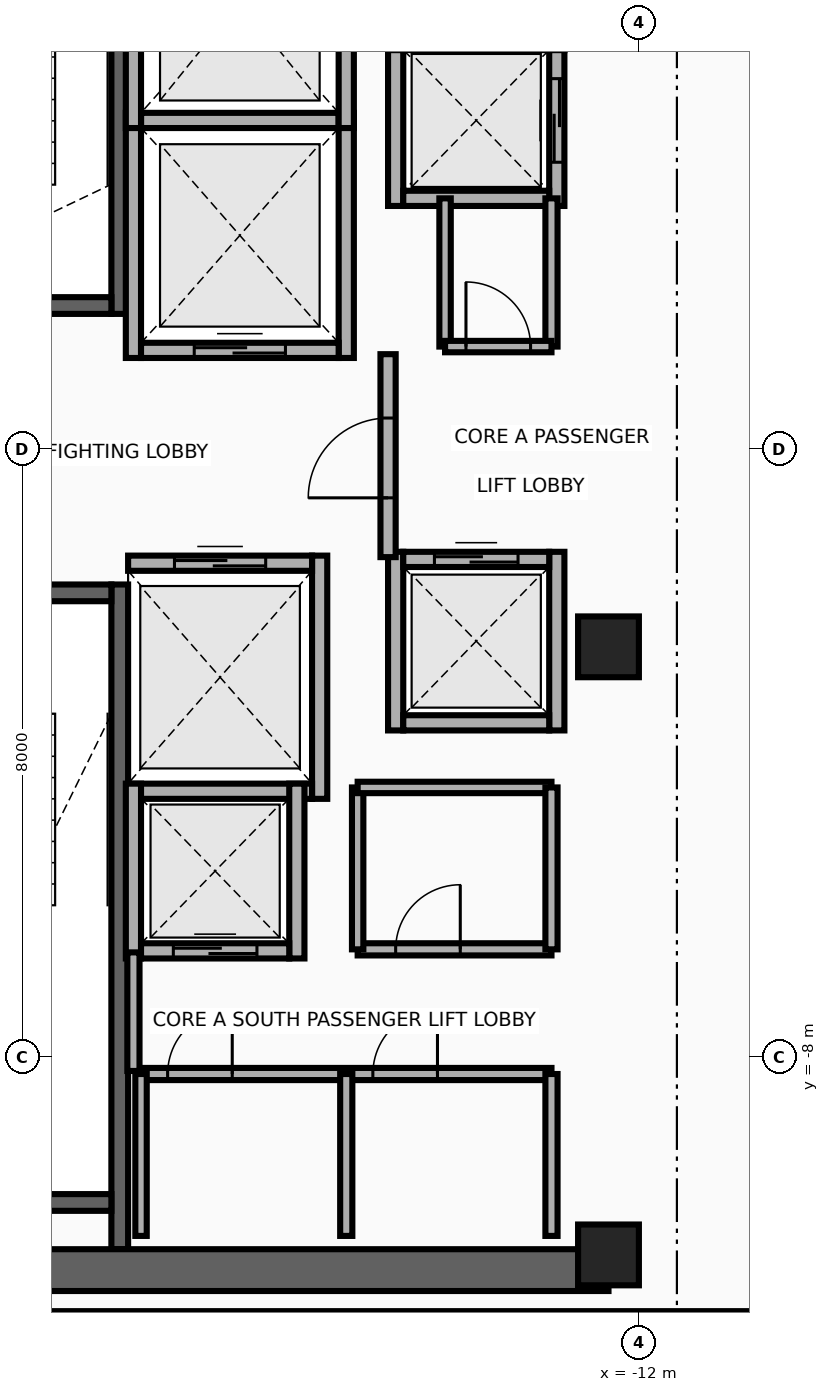
"""IFC4 building model, lengths in metres.
Left out: names, types, materials, properties, quantities, classifications, styles, units other than length and angle.
Written with IfcOpenShell. Run it as: python <this file> out.ifc"""

import sys

from ifc_helpers import new_model, si_unit, direction, frame, frame_2d, origin, origin_2d, place, context, subcontext, project, spatial, rectangle, extrude, source, transform, mapped, element, fill, save


model = new_model("IFC4")
c1 = context("Model", 3, precision=1e-05, world=origin(), true_north=direction((0.0, 1.0)))
c2 = subcontext(c1, "Body", "Model", "MODEL_VIEW")
j1 = project(units=[si_unit("LENGTHUNIT", "METRE"), si_unit("PLANEANGLEUNIT", "RADIAN")], contexts=[c1])
p1 = place(None, origin())
s1 = spatial("IfcSite", under=j1, at=p1, CompositionType="ELEMENT")
p2 = place(p1, origin())
s2 = spatial("IfcBuilding", under=s1, at=p2, CompositionType="ELEMENT")
p3 = place(p2, frame((0.0, 0.0, 280.0)))
s3 = spatial("IfcBuildingStorey", under=s2, at=p3, CompositionType="ELEMENT", Elevation=280.0)
p4 = place(p3, frame((-18.83, 1.78, 0.0), z_axis=(0.0, 0.0, 1.0), x_axis=(0.0, 1.0, 0.0)))
e1 = element("IfcWall", 1, at=p4, inside=s3, PredefinedType="SHEAR", context=c2, shape_type="SweptSolid", body=[
    extrude(rectangle(XDim=8.745, YDim=0.22, at=frame_2d((4.373, 0.0))), origin(), (0.0, 0.0, 1.0), 3.26),
])
p5 = place(p3, frame((-22.05, 1.89, 0.0), z_axis=(0.0, 0.0, 1.0), x_axis=(1.0, 0.0, 0.0)))
e2 = element("IfcWall", 2, at=p5, inside=s3, PredefinedType="SHEAR", context=c2, shape_type="SweptSolid", body=[
    extrude(rectangle(XDim=3.11, YDim=0.22, at=frame_2d((1.555, 0.0))), origin(), (0.0, 0.0, 1.0), 3.26),
])
p6 = place(p5, frame((1.0, 0.0, 0.0)))
e3 = element("IfcOpeningElement", 3, at=p6, cuts=e2, PredefinedType="OPENING", context=c2, shape_type="SweptSolid", body=[
    extrude(rectangle(XDim=1.1, YDim=2.15, at=frame_2d((0.55, 1.075))), frame((0.0, 0.125, 0.0), z_axis=(0.0, -1.0, 0.0), x_axis=(1.0, 0.0, 0.0)), (0.0, 0.0, 1.0), 0.25),
])
p7 = place(p3, frame((-18.83, -10.525, 0.0), z_axis=(0.0, 0.0, 1.0), x_axis=(0.0, 1.0, 0.0)))
e4 = element("IfcWall", 4, at=p7, inside=s3, PredefinedType="SHEAR", context=c2, shape_type="SweptSolid", body=[
    extrude(rectangle(XDim=8.745, YDim=0.22, at=frame_2d((4.373, 0.0))), origin(), (0.0, 0.0, 1.0), 3.26),
])
p8 = place(p3, frame((-22.05, -9.91, 0.0), z_axis=(0.0, 0.0, 1.0), x_axis=(1.0, 0.0, 0.0)))
e5 = element("IfcWall", 5, at=p8, inside=s3, PredefinedType="SHEAR", context=c2, shape_type="SweptSolid", body=[
    extrude(rectangle(XDim=3.11, YDim=0.22, at=frame_2d((1.555, 0.0))), origin(), (0.0, 0.0, 1.0), 3.26),
])
p9 = place(p3, frame((-22.05, -1.89, 0.0), z_axis=(0.0, 0.0, 1.0), x_axis=(1.0, 0.0, 0.0)))
e6 = element("IfcWall", 6, at=p9, inside=s3, PredefinedType="SHEAR", context=c2, shape_type="SweptSolid", body=[
    extrude(rectangle(XDim=3.11, YDim=0.22, at=frame_2d((1.555, 0.0))), origin(), (0.0, 0.0, 1.0), 3.26),
])
p10 = place(p9, frame((1.0, 0.0, 0.0)))
e7 = element("IfcOpeningElement", 7, at=p10, cuts=e6, PredefinedType="OPENING", context=c2, shape_type="SweptSolid", body=[
    extrude(rectangle(XDim=1.1, YDim=2.15, at=frame_2d((0.55, 1.075))), frame((0.0, 0.125, 0.0), z_axis=(0.0, -1.0, 0.0), x_axis=(1.0, 0.0, 0.0)), (0.0, 0.0, 1.0), 0.25),
])
p11 = place(p3, frame((-22.65, -10.8, 0.0), z_axis=(0.0, 0.0, 1.0), x_axis=(1.0, 0.0, 0.0)))
e8 = element("IfcWall", 8, at=p11, inside=s3, PredefinedType="SHEAR", context=c2, shape_type="SweptSolid", body=[
    extrude(rectangle(XDim=10.25, YDim=0.55, at=frame_2d((5.125, 0.0))), origin(), (0.0, 0.0, 1.0), 3.26),
])
m1 = source(origin(), c2, "Body", "SweptSolid", [
    extrude(rectangle(XDim=0.8, YDim=0.8, at=origin_2d()), origin(), (0.0, 0.0, 1.0), 3.5),
])
for number, where, z_axis, x_axis in (
    (9, (-12.4, -10.6, 0.0), (0.0, 0.0, 1.0), (1.0, 0.0, 0.0)),
    (10, (-12.4, -2.6, 0.0), (0.0, 0.0, 1.0), (1.0, 0.0, 0.0)),
):
    element("IfcColumn", number, at=place(p3, frame(where, z_axis=z_axis, x_axis=x_axis)), inside=s3, PredefinedType="COLUMN", context=c2, shape_type="MappedRepresentation", body=[
        mapped(m1, transform((0.0, 0.0, 0.0), x_axis=(1.0, 0.0, 0.0), y_axis=(0.0, 1.0, 0.0), z_axis=(0.0, 0.0, 1.0), scale=1.0)),
    ])
for number, where, z_axis, x_axis in (
    (11, (-18.65, 1.2, 0.0), (0.0, 0.0, 1.0), (0.0, 1.0, 0.0)),
    (12, (-15.85, 1.2, 0.0), (0.0, 0.0, 1.0), (0.0, 1.0, 0.0)),
):
    element("IfcWall", number, at=place(p3, frame(where, z_axis=z_axis, x_axis=x_axis)), inside=s3, PredefinedType="MOVABLE", context=c2, shape_type="SweptSolid", body=[
        extrude(rectangle(XDim=3.225, YDim=0.2, at=frame_2d((1.613, 0.0))), origin(), (0.0, 0.0, 1.0), 3.26),
    ])
p12 = place(p3, frame((-18.55, 1.3, 0.0), z_axis=(0.0, 0.0, 1.0), x_axis=(1.0, 0.0, 0.0)))
e13 = element("IfcWall", 13, at=p12, inside=s3, PredefinedType="MOVABLE", context=c2, shape_type="SweptSolid", body=[
    extrude(rectangle(XDim=2.6, YDim=0.2, at=frame_2d((1.3, 0.0))), origin(), (0.0, 0.0, 1.0), 3.26),
])
p13 = place(p12, frame((0.7, 0.0, 0.0)))
e14 = element("IfcOpeningElement", 14, at=p13, cuts=e13, PredefinedType="OPENING", context=c2, shape_type="SweptSolid", body=[
    extrude(rectangle(XDim=1.2, YDim=2.1, at=frame_2d((0.6, 1.05))), frame((0.0, 0.115, 0.0), z_axis=(0.0, -1.0, 0.0), x_axis=(1.0, 0.0, 0.0)), (0.0, 0.0, 1.0), 0.23),
])
p14 = place(p3, frame((-18.55, 4.325, 0.0), z_axis=(0.0, 0.0, 1.0), x_axis=(1.0, 0.0, 0.0)))
e15 = element("IfcWall", 15, at=p14, inside=s3, PredefinedType="MOVABLE", context=c2, shape_type="SweptSolid", body=[
    extrude(rectangle(XDim=2.6, YDim=0.2, at=frame_2d((1.3, 0.0))), origin(), (0.0, 0.0, 1.0), 3.26),
])
p15 = place(p3, frame((-16.2, -4.6, 0.0), z_axis=(0.0, 0.0, 1.0), x_axis=(0.0, 1.0, 0.0)))
e16 = element("IfcWall", 16, at=p15, inside=s3, PredefinedType="MOVABLE", context=c2, shape_type="SweptSolid", body=[
    extrude(rectangle(XDim=3.2, YDim=0.2, at=frame_2d((1.6, 0.0))), origin(), (0.0, 0.0, 1.0), 3.26),
])
p16 = place(p3, frame((-18.72, -4.5, 0.0), z_axis=(0.0, 0.0, 1.0), x_axis=(1.0, 0.0, 0.0)))
e17 = element("IfcWall", 17, at=p16, inside=s3, PredefinedType="MOVABLE", context=c2, shape_type="SweptSolid", body=[
    extrude(rectangle(XDim=2.42, YDim=0.2, at=frame_2d((1.21, 0.0))), origin(), (0.0, 0.0, 1.0), 3.26),
])
p17 = place(p3, frame((-18.72, -1.5, 0.0), z_axis=(0.0, 0.0, 1.0), x_axis=(1.0, 0.0, 0.0)))
e18 = element("IfcWall", 18, at=p17, inside=s3, PredefinedType="MOVABLE", context=c2, shape_type="SweptSolid", body=[
    extrude(rectangle(XDim=2.42, YDim=0.2, at=frame_2d((1.21, 0.0))), origin(), (0.0, 0.0, 1.0), 3.26),
])
p18 = place(p17, frame((0.61, 0.0, 0.0)))
e19 = element("IfcOpeningElement", 19, at=p18, cuts=e18, PredefinedType="OPENING", context=c2, shape_type="SweptSolid", body=[
    extrude(rectangle(XDim=1.2, YDim=2.1, at=frame_2d((0.6, 1.05))), frame((0.0, 0.115, 0.0), z_axis=(0.0, -1.0, 0.0), x_axis=(1.0, 0.0, 0.0)), (0.0, 0.0, 1.0), 0.23),
])
for number, where, z_axis, x_axis in (
    (20, (-18.65, 4.225, 0.0), (0.0, 0.0, 1.0), (0.0, 1.0, 0.0)),
    (21, (-15.85, 4.225, 0.0), (0.0, 0.0, 1.0), (0.0, 1.0, 0.0)),
):
    element("IfcWall", number, at=place(p3, frame(where, z_axis=z_axis, x_axis=x_axis)), inside=s3, PredefinedType="MOVABLE", context=c2, shape_type="SweptSolid", body=[
        extrude(rectangle(XDim=3.325, YDim=0.2, at=frame_2d((1.663, 0.0))), origin(), (0.0, 0.0, 1.0), 3.26),
    ])
p19 = place(p3, frame((-15.2, 3.2, 0.0), z_axis=(0.0, 0.0, 1.0), x_axis=(0.0, 1.0, 0.0)))
e22 = element("IfcWall", 22, at=p19, inside=s3, PredefinedType="MOVABLE", context=c2, shape_type="SweptSolid", body=[
    extrude(rectangle(XDim=2.25, YDim=0.2, at=frame_2d((1.125, 0.0))), origin(), (0.0, 0.0, 1.0), 3.26),
])
p20 = place(p3, frame((-13.08, 3.2, 0.0), z_axis=(0.0, 0.0, 1.0), x_axis=(0.0, 1.0, 0.0)))
e23 = element("IfcWall", 23, at=p20, inside=s3, PredefinedType="MOVABLE", context=c2, shape_type="SweptSolid", body=[
    extrude(rectangle(XDim=2.25, YDim=0.2, at=frame_2d((1.125, 0.0))), origin(), (0.0, 0.0, 1.0), 3.26),
])
p21 = place(p20, frame((0.575, 0.0, 0.0)))
e24 = element("IfcOpeningElement", 24, at=p21, cuts=e23, PredefinedType="OPENING", context=c2, shape_type="SweptSolid", body=[
    extrude(rectangle(XDim=1.1, YDim=2.1, at=frame_2d((0.55, 1.05))), frame((0.0, 0.115, 0.0), z_axis=(0.0, -1.0, 0.0), x_axis=(1.0, 0.0, 0.0)), (0.0, 0.0, 1.0), 0.23),
])
p22 = place(p3, frame((-15.1, 3.3, 0.0), z_axis=(0.0, 0.0, 1.0), x_axis=(1.0, 0.0, 0.0)))
e25 = element("IfcWall", 25, at=p22, inside=s3, PredefinedType="MOVABLE", context=c2, shape_type="SweptSolid", body=[
    extrude(rectangle(XDim=1.92, YDim=0.2, at=frame_2d((0.96, 0.0))), origin(), (0.0, 0.0, 1.0), 3.26),
])
for number, where, z_axis, x_axis in (
    (26, (-18.65, -6.7, 0.0), (0.0, 0.0, 1.0), (0.0, 1.0, 0.0)),
    (27, (-16.5, -6.7, 0.0), (0.0, 0.0, 1.0), (0.0, 1.0, 0.0)),
):
    element("IfcWall", number, at=place(p3, frame(where, z_axis=z_axis, x_axis=x_axis)), inside=s3, PredefinedType="MOVABLE", context=c2, shape_type="SweptSolid", body=[
        extrude(rectangle(XDim=2.3, YDim=0.2, at=frame_2d((1.15, 0.0))), origin(), (0.0, 0.0, 1.0), 3.26),
    ])
p23 = place(p3, frame((-18.55, -6.6, 0.0), z_axis=(0.0, 0.0, 1.0), x_axis=(1.0, 0.0, 0.0)))
e28 = element("IfcWall", 28, at=p23, inside=s3, PredefinedType="MOVABLE", context=c2, shape_type="SweptSolid", body=[
    extrude(rectangle(XDim=1.95, YDim=0.2, at=frame_2d((0.975, 0.0))), origin(), (0.0, 0.0, 1.0), 3.26),
])
p24 = place(p23, frame((0.425, 0.0, 0.0)))
e29 = element("IfcOpeningElement", 29, at=p24, cuts=e28, PredefinedType="OPENING", context=c2, shape_type="SweptSolid", body=[
    extrude(rectangle(XDim=1.1, YDim=2.1, at=frame_2d((0.55, 1.05))), frame((0.0, 0.115, 0.0), z_axis=(0.0, -1.0, 0.0), x_axis=(1.0, 0.0, 0.0)), (0.0, 0.0, 1.0), 0.23),
])
for number, where, z_axis, x_axis in (
    (30, (-15.2, -3.7, 0.0), (0.0, 0.0, 1.0), (0.0, 1.0, 0.0)),
    (31, (-13.08, -3.7, 0.0), (0.0, 0.0, 1.0), (0.0, 1.0, 0.0)),
):
    element("IfcWall", number, at=place(p3, frame(where, z_axis=z_axis, x_axis=x_axis)), inside=s3, PredefinedType="MOVABLE", context=c2, shape_type="SweptSolid", body=[
        extrude(rectangle(XDim=2.35, YDim=0.2, at=frame_2d((1.175, 0.0))), origin(), (0.0, 0.0, 1.0), 3.26),
    ])
p25 = place(p3, frame((-15.1, -3.6, 0.0), z_axis=(0.0, 0.0, 1.0), x_axis=(1.0, 0.0, 0.0)))
e32 = element("IfcWall", 32, at=p25, inside=s3, PredefinedType="MOVABLE", context=c2, shape_type="SweptSolid", body=[
    extrude(rectangle(XDim=1.92, YDim=0.2, at=frame_2d((0.96, 0.0))), origin(), (0.0, 0.0, 1.0), 3.26),
])
p26 = place(p3, frame((-15.1, -1.45, 0.0), z_axis=(0.0, 0.0, 1.0), x_axis=(1.0, 0.0, 0.0)))
e33 = element("IfcWall", 33, at=p26, inside=s3, PredefinedType="MOVABLE", context=c2, shape_type="SweptSolid", body=[
    extrude(rectangle(XDim=1.92, YDim=0.2, at=frame_2d((0.96, 0.0))), origin(), (0.0, 0.0, 1.0), 3.26),
])
p27 = place(p26, frame((0.41, 0.0, 0.0)))
e34 = element("IfcOpeningElement", 34, at=p27, cuts=e33, PredefinedType="OPENING", context=c2, shape_type="SweptSolid", body=[
    extrude(rectangle(XDim=1.1, YDim=2.1, at=frame_2d((0.55, 1.05))), frame((0.0, 0.115, 0.0), z_axis=(0.0, -1.0, 0.0), x_axis=(1.0, 0.0, 0.0)), (0.0, 0.0, 1.0), 0.23),
])
p28 = place(p3, frame((-15.3, -1.42, 0.0), z_axis=(0.0, 0.0, 1.0), x_axis=(0.0, 1.0, 0.0)))
e35 = element("IfcWall", 35, at=p28, inside=s3, PredefinedType="PARTITIONING", context=c2, shape_type="SweptSolid", body=[
    extrude(rectangle(XDim=2.67, YDim=0.2, at=frame_2d((1.335, 0.0))), origin(), (0.0, 0.0, 1.0), 3.26),
])
p29 = place(p28, frame((0.78, 0.0, 0.0)))
e36 = element("IfcOpeningElement", 36, at=p29, cuts=e35, PredefinedType="OPENING", context=c2, shape_type="SweptSolid", body=[
    extrude(rectangle(XDim=1.05, YDim=2.15, at=frame_2d((0.525, 1.075))), frame((0.0, 0.115, 0.0), z_axis=(0.0, -1.0, 0.0), x_axis=(1.0, 0.0, 0.0)), (0.0, 0.0, 1.0), 0.23),
])
p30 = place(p3, frame((-18.65, -8.18, 0.0), z_axis=(0.0, 0.0, 1.0), x_axis=(0.0, 1.0, 0.0)))
e37 = element("IfcWall", 37, at=p30, inside=s3, PredefinedType="PARTITIONING", context=c2, shape_type="SweptSolid", body=[
    extrude(rectangle(XDim=1.56, YDim=0.16, at=frame_2d((0.78, 0.0))), origin(), (0.0, 0.0, 1.0), 3.26),
])
p31 = place(p3, frame((-18.55, -8.22, 0.0), z_axis=(0.0, 0.0, 1.0), x_axis=(1.0, 0.0, 0.0)))
e38 = element("IfcWall", 38, at=p31, inside=s3, PredefinedType="PARTITIONING", context=c2, shape_type="SweptSolid", body=[
    extrude(rectangle(XDim=5.4, YDim=0.16, at=frame_2d((2.7, 0.0))), origin(), (0.0, 0.0, 1.0), 3.26),
])
p32 = place(p31, frame((0.35, 0.0, 0.0)))
e39 = element("IfcOpeningElement", 39, at=p32, cuts=e38, PredefinedType="OPENING", context=c2, shape_type="SweptSolid", body=[
    extrude(rectangle(XDim=0.85, YDim=2.05, at=frame_2d((0.425, 1.025))), frame((0.0, 0.095, 0.0), z_axis=(0.0, -1.0, 0.0), x_axis=(1.0, 0.0, 0.0)), (0.0, 0.0, 1.0), 0.19),
])
p33 = place(p31, frame((3.05, 0.0, 0.0)))
e40 = element("IfcOpeningElement", 40, at=p33, cuts=e38, PredefinedType="OPENING", context=c2, shape_type="SweptSolid", body=[
    extrude(rectangle(XDim=0.85, YDim=2.05, at=frame_2d((0.425, 1.025))), frame((0.0, 0.095, 0.0), z_axis=(0.0, -1.0, 0.0), x_axis=(1.0, 0.0, 0.0)), (0.0, 0.0, 1.0), 0.19),
])
p34 = place(p3, frame((-18.55, -10.35, 0.0), z_axis=(0.0, 0.0, 1.0), x_axis=(0.0, 1.0, 0.0)))
e41 = element("IfcWall", 41, at=p34, inside=s3, PredefinedType="PARTITIONING", context=c2, shape_type="SweptSolid", body=[
    extrude(rectangle(XDim=2.13, YDim=0.15, at=frame_2d((1.065, 0.0))), origin(), (0.0, 0.0, 1.0), 3.26),
])
for number, where, z_axis, x_axis in (
    (42, (-13.15, -10.35, 0.0), (0.0, 0.0, 1.0), (0.0, 1.0, 0.0)),
    (43, (-15.85, -10.35, 0.0), (0.0, 0.0, 1.0), (0.0, 1.0, 0.0)),
):
    element("IfcWall", number, at=place(p3, frame(where, z_axis=z_axis, x_axis=x_axis)), inside=s3, PredefinedType="PARTITIONING", context=c2, shape_type="SweptSolid", body=[
        extrude(rectangle(XDim=2.13, YDim=0.16, at=frame_2d((1.065, 0.0))), origin(), (0.0, 0.0, 1.0), 3.26),
    ])
p35 = place(p3, frame((-15.7, -6.58, 0.0), z_axis=(0.0, 0.0, 1.0), x_axis=(1.0, 0.0, 0.0)))
e44 = element("IfcWall", 44, at=p35, inside=s3, PredefinedType="PARTITIONING", context=c2, shape_type="SweptSolid", body=[
    extrude(rectangle(XDim=2.55, YDim=0.16, at=frame_2d((1.275, 0.0))), origin(), (0.0, 0.0, 1.0), 3.26),
])
p36 = place(p35, frame((0.5, 0.0, 0.0)))
e45 = element("IfcOpeningElement", 45, at=p36, cuts=e44, PredefinedType="OPENING", context=c2, shape_type="SweptSolid", body=[
    extrude(rectangle(XDim=0.85, YDim=2.05, at=frame_2d((0.425, 1.025))), frame((0.0, 0.095, 0.0), z_axis=(0.0, -1.0, 0.0), x_axis=(1.0, 0.0, 0.0)), (0.0, 0.0, 1.0), 0.19),
])
p37 = place(p3, frame((-15.7, -6.58, 0.0), z_axis=(0.0, 0.0, 1.0), x_axis=(0.0, 1.0, 0.0)))
e46 = element("IfcWall", 46, at=p37, inside=s3, PredefinedType="PARTITIONING", context=c2, shape_type="SweptSolid", body=[
    extrude(rectangle(XDim=2.13, YDim=0.15, at=frame_2d((1.065, 0.0))), origin(), (0.0, 0.0, 1.0), 3.26),
])
p38 = place(p3, frame((-15.7, -4.45, 0.0), z_axis=(0.0, 0.0, 1.0), x_axis=(1.0, 0.0, 0.0)))
e47 = element("IfcWall", 47, at=p38, inside=s3, PredefinedType="PARTITIONING", context=c2, shape_type="SweptSolid", body=[
    extrude(rectangle(XDim=2.55, YDim=0.15, at=frame_2d((1.275, 0.0))), origin(), (0.0, 0.0, 1.0), 3.26),
])
p39 = place(p3, frame((-13.15, -6.58, 0.0), z_axis=(0.0, 0.0, 1.0), x_axis=(0.0, 1.0, 0.0)))
e48 = element("IfcWall", 48, at=p39, inside=s3, PredefinedType="PARTITIONING", context=c2, shape_type="SweptSolid", body=[
    extrude(rectangle(XDim=2.13, YDim=0.16, at=frame_2d((1.065, 0.0))), origin(), (0.0, 0.0, 1.0), 3.26),
])
p40 = place(p3, frame((-13.15, 1.35, 0.0), z_axis=(0.0, 0.0, 1.0), x_axis=(0.0, 1.0, 0.0)))
e49 = element("IfcWall", 49, at=p40, inside=s3, PredefinedType="PARTITIONING", context=c2, shape_type="SweptSolid", body=[
    extrude(rectangle(XDim=1.95, YDim=0.16, at=frame_2d((0.975, 0.0))), origin(), (0.0, 0.0, 1.0), 3.26),
])
p41 = place(p3, frame((-14.55, 1.35, 0.0), z_axis=(0.0, 0.0, 1.0), x_axis=(0.0, 1.0, 0.0)))
e50 = element("IfcWall", 50, at=p41, inside=s3, PredefinedType="PARTITIONING", context=c2, shape_type="SweptSolid", body=[
    extrude(rectangle(XDim=1.95, YDim=0.15, at=frame_2d((0.975, 0.0))), origin(), (0.0, 0.0, 1.0), 3.26),
])
p42 = place(p3, frame((-14.55, 1.35, 0.0), z_axis=(0.0, 0.0, 1.0), x_axis=(1.0, 0.0, 0.0)))
e51 = element("IfcWall", 51, at=p42, inside=s3, PredefinedType="PARTITIONING", context=c2, shape_type="SweptSolid", body=[
    extrude(rectangle(XDim=1.4, YDim=0.15, at=frame_2d((0.7, 0.0))), origin(), (0.0, 0.0, 1.0), 3.26),
])
p43 = place(p42, frame((0.275, 0.0, 0.0)))
e52 = element("IfcOpeningElement", 52, at=p43, cuts=e51, PredefinedType="OPENING", context=c2, shape_type="SweptSolid", body=[
    extrude(rectangle(XDim=0.85, YDim=2.05, at=frame_2d((0.425, 1.025))), frame((0.0, 0.09, 0.0), z_axis=(0.0, -1.0, 0.0), x_axis=(1.0, 0.0, 0.0)), (0.0, 0.0, 1.0), 0.18),
])
p44 = place(p3, frame((-23.45, -11.42, 0.0), z_axis=(0.0, 0.0, 1.0), x_axis=(1.0, 0.0, 0.0)))
e53 = element("IfcWall", 53, at=p44, inside=s3, PredefinedType="PARTITIONING", context=c2, shape_type="SweptSolid", body=[
    extrude(rectangle(XDim=13.84, YDim=0.16, at=frame_2d((6.92, 0.0))), origin(), (0.0, 0.0, 1.0), 2.634),
])
p45 = place(p13, origin())
e54 = element("IfcDoor", 54, at=p45, inside=s3, OperationType="DOUBLE_DOOR_SLIDING", PredefinedType="DOOR", context=c2, shape_type="SweptSolid", body=[
    extrude(rectangle(XDim=1.2, YDim=2.1, at=frame_2d((0.6, 1.05))), frame((0.0, 0.025, 0.0), z_axis=(0.0, -1.0, 0.0), x_axis=(1.0, 0.0, 0.0)), (0.0, 0.0, 1.0), 0.05),
])
fill(e14, e54)
p46 = place(p18, origin())
e55 = element("IfcDoor", 55, at=p46, inside=s3, OperationType="DOUBLE_DOOR_SLIDING", PredefinedType="DOOR", context=c2, shape_type="SweptSolid", body=[
    extrude(rectangle(XDim=1.2, YDim=2.1, at=frame_2d((0.6, 1.05))), frame((0.0, 0.025, 0.0), z_axis=(0.0, -1.0, 0.0), x_axis=(1.0, 0.0, 0.0)), (0.0, 0.0, 1.0), 0.05),
])
fill(e19, e55)
p47 = place(p21, origin())
e56 = element("IfcDoor", 56, at=p47, inside=s3, OperationType="DOUBLE_DOOR_SLIDING", PredefinedType="DOOR", context=c2, shape_type="SweptSolid", body=[
    extrude(rectangle(XDim=1.1, YDim=2.1, at=frame_2d((0.55, 1.05))), frame((0.0, 0.025, 0.0), z_axis=(0.0, -1.0, 0.0), x_axis=(1.0, 0.0, 0.0)), (0.0, 0.0, 1.0), 0.05),
])
fill(e24, e56)
p48 = place(p24, origin())
e57 = element("IfcDoor", 57, at=p48, inside=s3, OperationType="DOUBLE_DOOR_SLIDING", PredefinedType="DOOR", context=c2, shape_type="SweptSolid", body=[
    extrude(rectangle(XDim=1.1, YDim=2.1, at=frame_2d((0.55, 1.05))), frame((0.0, 0.025, 0.0), z_axis=(0.0, -1.0, 0.0), x_axis=(1.0, 0.0, 0.0)), (0.0, 0.0, 1.0), 0.05),
])
fill(e29, e57)
p49 = place(p27, origin())
e58 = element("IfcDoor", 58, at=p49, inside=s3, OperationType="DOUBLE_DOOR_SLIDING", PredefinedType="DOOR", context=c2, shape_type="SweptSolid", body=[
    extrude(rectangle(XDim=1.1, YDim=2.1, at=frame_2d((0.55, 1.05))), frame((0.0, 0.025, 0.0), z_axis=(0.0, -1.0, 0.0), x_axis=(1.0, 0.0, 0.0)), (0.0, 0.0, 1.0), 0.05),
])
fill(e34, e58)
p50 = place(p29, origin())
e59 = element("IfcDoor", 59, at=p50, inside=s3, OperationType="SINGLE_SWING_RIGHT", PredefinedType="DOOR", context=c2, shape_type="SweptSolid", body=[
    extrude(rectangle(XDim=1.05, YDim=2.15, at=frame_2d((0.525, 1.075))), frame((0.0, 0.025, 0.0), z_axis=(0.0, -1.0, 0.0), x_axis=(1.0, 0.0, 0.0)), (0.0, 0.0, 1.0), 0.05),
])
fill(e36, e59)
p51 = place(p32, origin())
e60 = element("IfcDoor", 60, at=p51, inside=s3, OperationType="SINGLE_SWING_RIGHT", PredefinedType="DOOR", context=c2, shape_type="SweptSolid", body=[
    extrude(rectangle(XDim=0.85, YDim=2.05, at=frame_2d((0.425, 1.025))), frame((0.0, 0.025, 0.0), z_axis=(0.0, -1.0, 0.0), x_axis=(1.0, 0.0, 0.0)), (0.0, 0.0, 1.0), 0.05),
])
fill(e39, e60)
p52 = place(p33, origin())
e61 = element("IfcDoor", 61, at=p52, inside=s3, OperationType="SINGLE_SWING_LEFT", PredefinedType="DOOR", context=c2, shape_type="SweptSolid", body=[
    extrude(rectangle(XDim=0.85, YDim=2.05, at=frame_2d((0.425, 1.025))), frame((0.0, 0.025, 0.0), z_axis=(0.0, -1.0, 0.0), x_axis=(1.0, 0.0, 0.0)), (0.0, 0.0, 1.0), 0.05),
])
fill(e40, e61)
p53 = place(p36, origin())
e62 = element("IfcDoor", 62, at=p53, inside=s3, OperationType="SINGLE_SWING_RIGHT", PredefinedType="DOOR", context=c2, shape_type="SweptSolid", body=[
    extrude(rectangle(XDim=0.85, YDim=2.05, at=frame_2d((0.425, 1.025))), frame((0.0, 0.025, 0.0), z_axis=(0.0, -1.0, 0.0), x_axis=(1.0, 0.0, 0.0)), (0.0, 0.0, 1.0), 0.05),
])
fill(e45, e62)
p54 = place(p43, origin())
e63 = element("IfcDoor", 63, at=p54, inside=s3, OperationType="SINGLE_SWING_LEFT", PredefinedType="DOOR", context=c2, shape_type="SweptSolid", body=[
    extrude(rectangle(XDim=0.85, YDim=2.05, at=frame_2d((0.425, 1.025))), frame((0.0, 0.025, 0.0), z_axis=(0.0, -1.0, 0.0), x_axis=(1.0, 0.0, 0.0)), (0.0, 0.0, 1.0), 0.05),
])
fill(e52, e63)
save(model, sys.argv[1])
